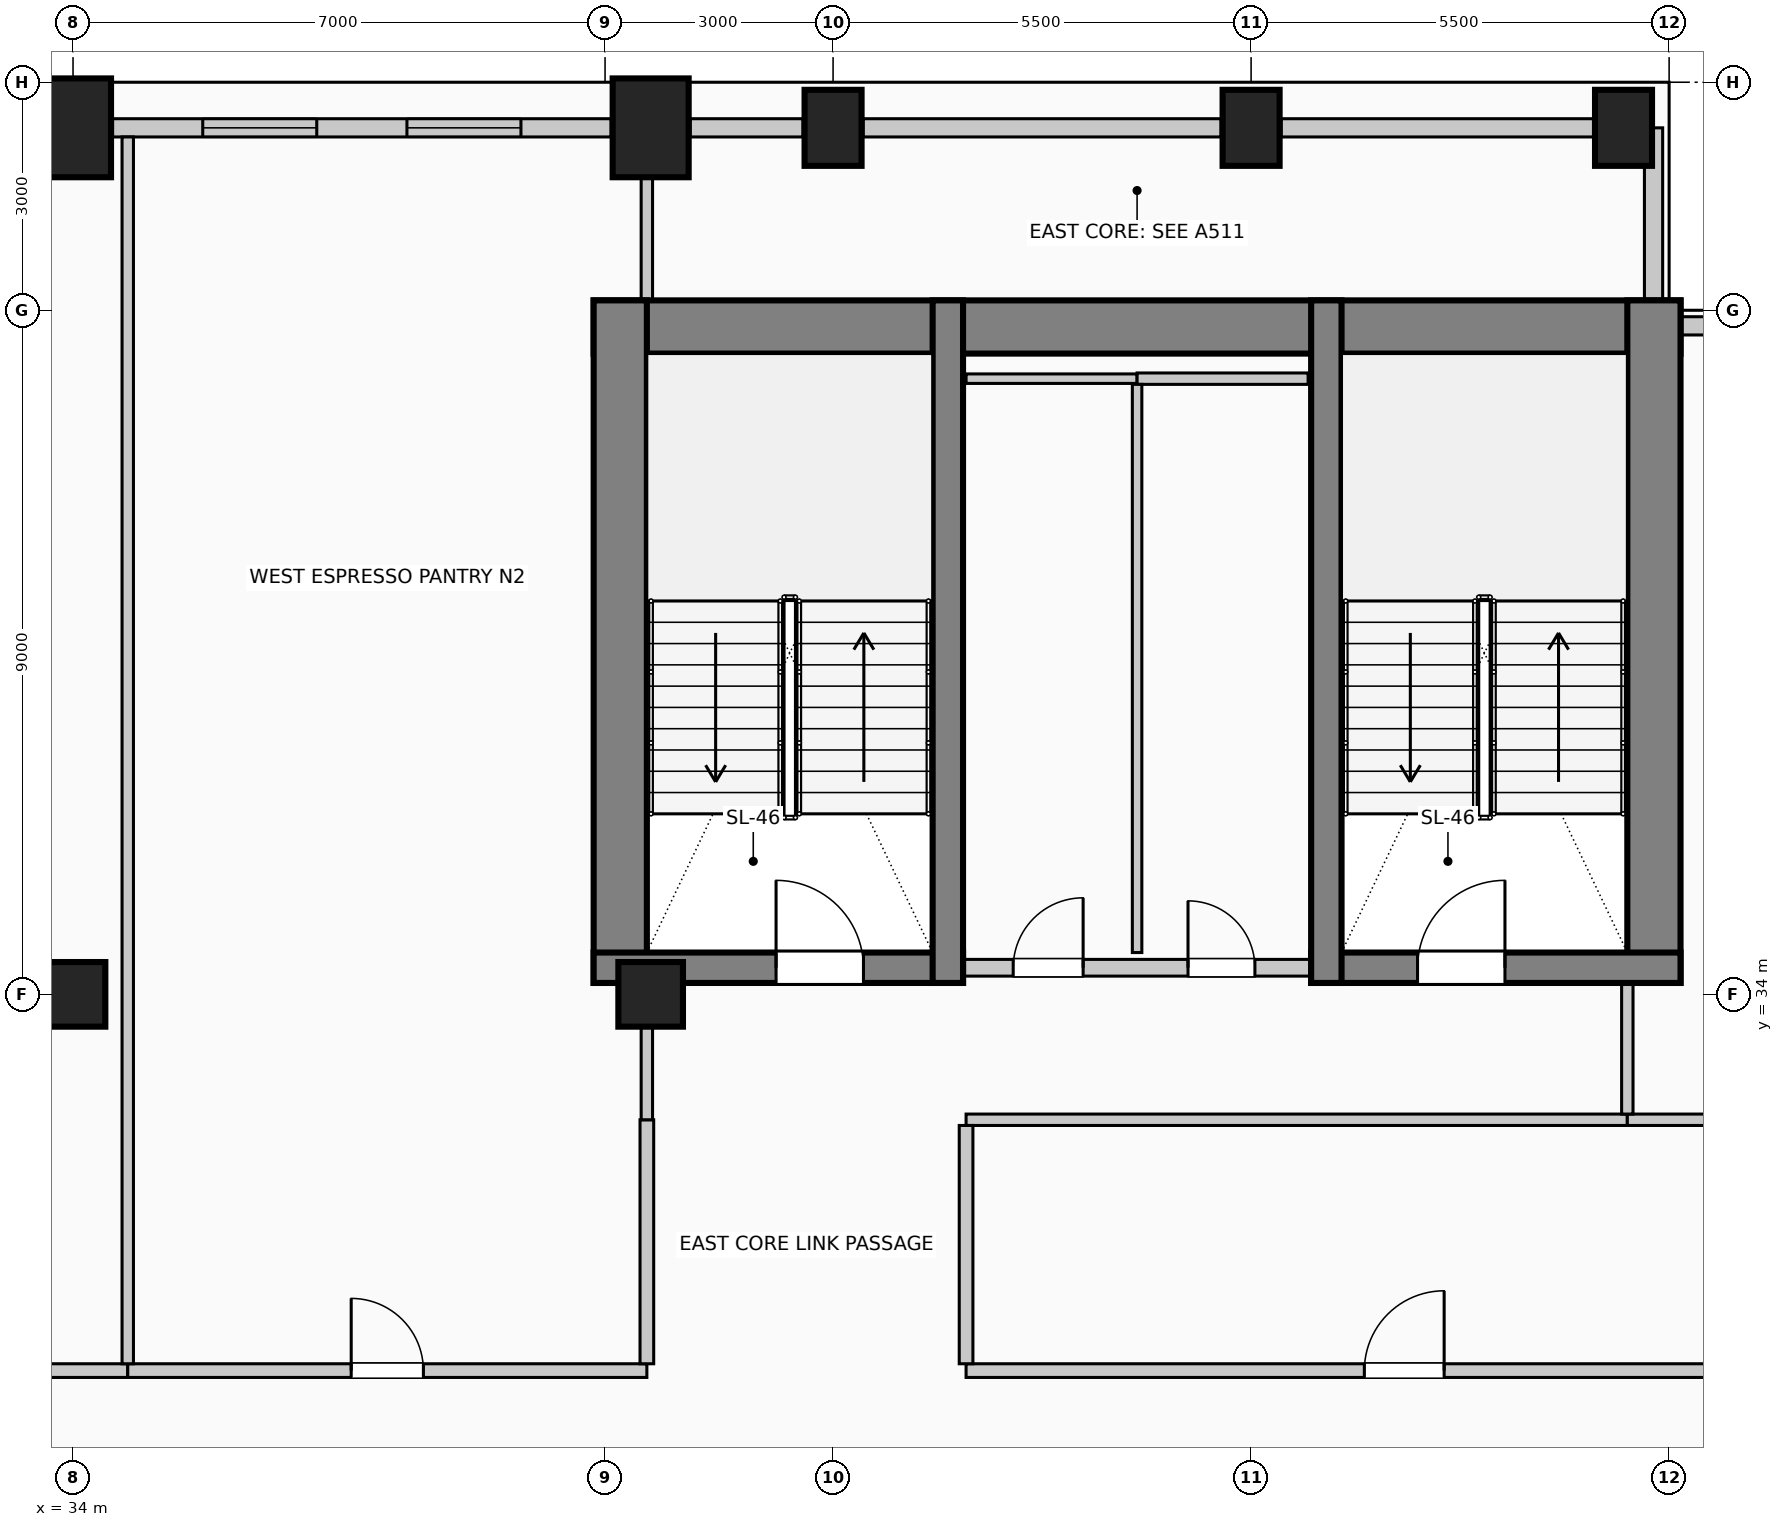
"""IFC4 building model, lengths in metres.
Left out: names, types, materials, properties, quantities, classifications, styles, units other than length and angle.
Written with IfcOpenShell. Run it as: python <this file> out.ifc"""

import sys

from ifc_helpers import new_model, si_unit, direction, frame, frame_2d, origin, origin_2d, place, context, subcontext, project, spatial, rectangle, circle, extrude, element, fill, save


model = new_model("IFC4")
c1 = context("Model", 3, precision=1e-05, world=origin(), true_north=direction((0.0, 1.0)))
c2 = subcontext(c1, "Body", "Model", "MODEL_VIEW")
j1 = project(units=[si_unit("LENGTHUNIT", "METRE"), si_unit("PLANEANGLEUNIT", "RADIAN")], contexts=[c1])
p1 = place(None, origin())
s1 = spatial("IfcSite", under=j1, at=p1, CompositionType="ELEMENT")
p2 = place(p1, origin())
s2 = spatial("IfcBuilding", under=s1, at=p2, CompositionType="ELEMENT")
p3 = place(p2, frame((0.0, 0.0, 234.6)))
s3 = spatial("IfcBuildingStorey", under=s2, at=p3, CompositionType="ELEMENT", Elevation=234.6)
p4 = place(p3, frame((40.85, 42.78, 0.0), z_axis=(0.0, 0.0, 1.0), x_axis=(1.0, 0.0, 0.0)))
e1 = element("IfcWall", 1, at=p4, inside=s3, PredefinedType="SHEAR", context=c2, shape_type="SweptSolid", body=[
    extrude(rectangle(XDim=14.3, YDim=0.7, at=frame_2d((7.15, 0.0))), origin(), (0.0, 0.0, 1.0), 4.0),
])
for number, where, z_axis, x_axis in (
    (2, (41.2, 34.15, 0.0), (0.0, 0.0, 1.0), (0.0, 1.0, 0.0)),
    (3, (54.8, 34.15, 0.0), (0.0, 0.0, 1.0), (0.0, 1.0, 0.0)),
):
    element("IfcWall", number, at=place(p3, frame(where, z_axis=z_axis, x_axis=x_axis)), inside=s3, PredefinedType="SHEAR", context=c2, shape_type="SweptSolid", body=[
        extrude(rectangle(XDim=8.98, YDim=0.7, at=frame_2d((4.49, 0.0))), origin(), (0.0, 0.0, 1.0), 4.0),
    ])
p5 = place(p3, frame((40.85, 34.35, 0.0), z_axis=(0.0, 0.0, 1.0), x_axis=(1.0, 0.0, 0.0)))
e4 = element("IfcWall", 4, at=p5, inside=s3, PredefinedType="SHEAR", context=c2, shape_type="SweptSolid", body=[
    extrude(rectangle(XDim=4.86, YDim=0.4, at=frame_2d((2.43, 0.0))), origin(), (0.0, 0.0, 1.0), 4.0),
])
p6 = place(p5, frame((2.4, 0.0, 0.0)))
e5 = element("IfcOpeningElement", 5, at=p6, cuts=e4, PredefinedType="OPENING", context=c2, shape_type="SweptSolid", body=[
    extrude(rectangle(XDim=1.15, YDim=2.2, at=frame_2d((0.575, 1.1))), frame((0.0, 0.21, 0.0), z_axis=(0.0, -1.0, 0.0), x_axis=(1.0, 0.0, 0.0)), (0.0, 0.0, 1.0), 0.42),
])
p7 = place(p3, frame((45.51, 34.15, 0.0), z_axis=(0.0, 0.0, 1.0), x_axis=(0.0, 1.0, 0.0)))
e6 = element("IfcWall", 6, at=p7, inside=s3, PredefinedType="SHEAR", context=c2, shape_type="SweptSolid", body=[
    extrude(rectangle(XDim=8.98, YDim=0.4, at=frame_2d((4.49, 0.0))), origin(), (0.0, 0.0, 1.0), 4.0),
])
p8 = place(p3, frame((50.29, 34.35, 0.0), z_axis=(0.0, 0.0, 1.0), x_axis=(1.0, 0.0, 0.0)))
e7 = element("IfcWall", 7, at=p8, inside=s3, PredefinedType="SHEAR", context=c2, shape_type="SweptSolid", body=[
    extrude(rectangle(XDim=4.86, YDim=0.4, at=frame_2d((2.43, 0.0))), origin(), (0.0, 0.0, 1.0), 4.0),
])
p9 = place(p8, frame((1.4, 0.0, 0.0)))
e8 = element("IfcOpeningElement", 8, at=p9, cuts=e7, PredefinedType="OPENING", context=c2, shape_type="SweptSolid", body=[
    extrude(rectangle(XDim=1.15, YDim=2.2, at=frame_2d((0.575, 1.1))), frame((0.0, 0.21, 0.0), z_axis=(0.0, -1.0, 0.0), x_axis=(1.0, 0.0, 0.0)), (0.0, 0.0, 1.0), 0.42),
])
p10 = place(p3, frame((50.49, 34.15, 0.0), z_axis=(0.0, 0.0, 1.0), x_axis=(0.0, 1.0, 0.0)))
e9 = element("IfcWall", 9, at=p10, inside=s3, PredefinedType="SHEAR", context=c2, shape_type="SweptSolid", body=[
    extrude(rectangle(XDim=8.98, YDim=0.4, at=frame_2d((4.49, 0.0))), origin(), (0.0, 0.0, 1.0), 4.0),
])
for number, where, z_axis, x_axis in (
    (10, (34.0, 45.4, 0.0), (0.0, 0.0, 1.0), (1.0, 0.0, 0.0)),
    (11, (41.6, 45.4, 0.0), (0.0, 0.0, 1.0), (1.0, 0.0, 0.0)),
):
    element("IfcColumn", number, at=place(p3, frame(where, z_axis=z_axis, x_axis=x_axis)), inside=s3, PredefinedType="COLUMN", context=c2, shape_type="SweptSolid", body=[
        extrude(rectangle(XDim=1.0, YDim=1.3, at=origin_2d()), origin(), (0.0, 0.0, 1.0), 4.0),
    ])
for number, where, z_axis, x_axis in (
    (12, (44.0, 45.4, 0.0), (0.0, 0.0, 1.0), (1.0, 0.0, 0.0)),
    (13, (49.5, 45.4, 0.0), (0.0, 0.0, 1.0), (1.0, 0.0, 0.0)),
    (14, (54.4, 45.4, 0.0), (0.0, 0.0, 1.0), (1.0, 0.0, 0.0)),
):
    element("IfcColumn", number, at=place(p3, frame(where, z_axis=z_axis, x_axis=x_axis)), inside=s3, PredefinedType="COLUMN", context=c2, shape_type="SweptSolid", body=[
        extrude(rectangle(XDim=0.75, YDim=1.0, at=origin_2d()), origin(), (0.0, 0.0, 1.0), 4.0),
    ])
for number, where, z_axis, x_axis in (
    (15, (41.6, 34.0, 0.0), (0.0, 0.0, 1.0), (1.0, 0.0, 0.0)),
    (16, (34.0, 34.0, 0.0), (0.0, 0.0, 1.0), (1.0, 0.0, 0.0)),
):
    element("IfcColumn", number, at=place(p3, frame(where, z_axis=z_axis, x_axis=x_axis)), inside=s3, PredefinedType="COLUMN", context=c2, shape_type="SweptSolid", body=[
        extrude(circle(Radius=0.425, at=origin_2d()), origin(), (0.0, 0.0, 1.0), 4.0),
    ])
p11 = place(p3, frame((34.52, 45.4, 0.0), z_axis=(0.0, 0.0, 1.0), x_axis=(1.0, 0.0, 0.0)))
e17 = element("IfcWall", 17, at=p11, inside=s3, PredefinedType="SOLIDWALL", context=c2, shape_type="SweptSolid", body=[
    extrude(rectangle(XDim=6.56, YDim=0.24, at=frame_2d((3.28, 0.0))), origin(), (0.0, 0.0, 1.0), 2.91),
])
p12 = place(p11, frame((1.187, 0.0, 0.42)))
e18 = element("IfcOpeningElement", 18, at=p12, cuts=e17, PredefinedType="OPENING", context=c2, shape_type="SweptSolid", body=[
    extrude(rectangle(XDim=1.5, YDim=2.2, at=frame_2d((0.75, 1.1))), frame((0.0, 0.13, 0.0), z_axis=(0.0, -1.0, 0.0), x_axis=(1.0, 0.0, 0.0)), (0.0, 0.0, 1.0), 0.26),
])
p13 = place(p11, frame((3.873, 0.0, 0.42)))
e19 = element("IfcOpeningElement", 19, at=p13, cuts=e17, PredefinedType="OPENING", context=c2, shape_type="SweptSolid", body=[
    extrude(rectangle(XDim=1.5, YDim=2.2, at=frame_2d((0.75, 1.1))), frame((0.0, 0.13, 0.0), z_axis=(0.0, -1.0, 0.0), x_axis=(1.0, 0.0, 0.0)), (0.0, 0.0, 1.0), 0.26),
])
p14 = place(p3, frame((42.12, 45.4, 0.0), z_axis=(0.0, 0.0, 1.0), x_axis=(1.0, 0.0, 0.0)))
e20 = element("IfcWall", 20, at=p14, inside=s3, PredefinedType="SOLIDWALL", context=c2, shape_type="SweptSolid", body=[
    extrude(rectangle(XDim=1.485, YDim=0.24, at=frame_2d((0.742, 0.0))), origin(), (0.0, 0.0, 1.0), 2.91),
])
p15 = place(p3, frame((44.395, 45.4, 0.0), z_axis=(0.0, 0.0, 1.0), x_axis=(1.0, 0.0, 0.0)))
e21 = element("IfcWall", 21, at=p15, inside=s3, PredefinedType="SOLIDWALL", context=c2, shape_type="SweptSolid", body=[
    extrude(rectangle(XDim=4.71, YDim=0.24, at=frame_2d((2.355, 0.0))), origin(), (0.0, 0.0, 1.0), 2.91),
])
p16 = place(p3, frame((49.895, 45.4, 0.0), z_axis=(0.0, 0.0, 1.0), x_axis=(1.0, 0.0, 0.0)))
e22 = element("IfcWall", 22, at=p16, inside=s3, PredefinedType="SOLIDWALL", context=c2, shape_type="SweptSolid", body=[
    extrude(rectangle(XDim=4.11, YDim=0.24, at=frame_2d((2.055, 0.0))), origin(), (0.0, 0.0, 1.0), 2.91),
])
p17 = place(p3, frame((54.795, 45.4, 0.0), z_axis=(0.0, 0.0, 1.0), x_axis=(0.0, -1.0, 0.0)))
e23 = element("IfcWall", 23, at=p17, inside=s3, PredefinedType="SOLIDWALL", context=c2, shape_type="SweptSolid", body=[
    extrude(rectangle(XDim=2.265, YDim=0.24, at=frame_2d((1.132, 0.0))), origin(), (0.0, 0.0, 1.0), 3.66),
])
p18 = place(p3, frame((55.155, 42.795, 0.0), z_axis=(0.0, 0.0, 1.0), x_axis=(1.0, 0.0, 0.0)))
e24 = element("IfcWall", 24, at=p18, inside=s3, PredefinedType="SOLIDWALL", context=c2, shape_type="SweptSolid", body=[
    extrude(rectangle(XDim=2.245, YDim=0.24, at=frame_2d((1.123, 0.0))), origin(), (0.0, 0.0, 1.0), 3.66),
])
p19 = place(p3, frame((45.72, 34.35, 0.0), z_axis=(0.0, 0.0, 1.0), x_axis=(1.0, 0.0, 0.0)))
e25 = element("IfcWall", 25, at=p19, inside=s3, PredefinedType="PARTITIONING", context=c2, shape_type="SweptSolid", body=[
    extrude(rectangle(XDim=4.56, YDim=0.22, at=frame_2d((2.28, 0.0))), origin(), (0.0, 0.0, 1.0), 3.66),
])
p20 = place(p19, frame((0.65, 0.0, 0.0)))
e26 = element("IfcOpeningElement", 26, at=p20, cuts=e25, PredefinedType="OPENING", context=c2, shape_type="SweptSolid", body=[
    extrude(rectangle(XDim=0.92, YDim=2.1, at=frame_2d((0.46, 1.05))), frame((0.0, 0.12, 0.0), z_axis=(0.0, -1.0, 0.0), x_axis=(1.0, 0.0, 0.0)), (0.0, 0.0, 1.0), 0.24),
])
p21 = place(p19, frame((2.95, 0.0, 0.0)))
e27 = element("IfcOpeningElement", 27, at=p21, cuts=e25, PredefinedType="OPENING", context=c2, shape_type="SweptSolid", body=[
    extrude(rectangle(XDim=0.88, YDim=2.1, at=frame_2d((0.44, 1.05))), frame((0.0, 0.12, 0.0), z_axis=(0.0, -1.0, 0.0), x_axis=(1.0, 0.0, 0.0)), (0.0, 0.0, 1.0), 0.24),
])
p22 = place(p3, frame((23.1, 29.05, 0.0), z_axis=(0.0, 0.0, 1.0), x_axis=(1.0, 0.0, 0.0)))
e28 = element("IfcWall", 28, at=p22, inside=s3, PredefinedType="PARTITIONING", context=c2, shape_type="SweptSolid", body=[
    extrude(rectangle(XDim=11.62, YDim=0.18, at=frame_2d((5.81, 0.0))), origin(), (0.0, 0.0, 1.0), 3.66),
])
p23 = place(p22, frame((5.285, 0.0, 0.0)))
e29 = element("IfcOpeningElement", 29, at=p23, cuts=e28, PredefinedType="OPENING", context=c2, shape_type="SweptSolid", body=[
    extrude(rectangle(XDim=1.05, YDim=2.15, at=frame_2d((0.525, 1.075))), frame((0.0, 0.1, 0.0), z_axis=(0.0, -1.0, 0.0), x_axis=(1.0, 0.0, 0.0)), (0.0, 0.0, 1.0), 0.2),
])
p24 = place(p3, frame((34.72, 29.05, 0.0), z_axis=(0.0, 0.0, 1.0), x_axis=(1.0, 0.0, 0.0)))
e30 = element("IfcWall", 30, at=p24, inside=s3, PredefinedType="PARTITIONING", context=c2, shape_type="SweptSolid", body=[
    extrude(rectangle(XDim=6.83, YDim=0.18, at=frame_2d((3.415, 0.0))), origin(), (0.0, 0.0, 1.0), 3.66),
])
p25 = place(p24, frame((2.94, 0.0, 0.0)))
e31 = element("IfcOpeningElement", 31, at=p25, cuts=e30, PredefinedType="OPENING", context=c2, shape_type="SweptSolid", body=[
    extrude(rectangle(XDim=0.95, YDim=2.15, at=frame_2d((0.475, 1.075))), frame((0.0, 0.1, 0.0), z_axis=(0.0, -1.0, 0.0), x_axis=(1.0, 0.0, 0.0)), (0.0, 0.0, 1.0), 0.2),
])
p26 = place(p3, frame((45.75, 29.05, 0.0), z_axis=(0.0, 0.0, 1.0), x_axis=(1.0, 0.0, 0.0)))
e32 = element("IfcWall", 32, at=p26, inside=s3, PredefinedType="PARTITIONING", context=c2, shape_type="SweptSolid", body=[
    extrude(rectangle(XDim=11.53, YDim=0.18, at=frame_2d((5.765, 0.0))), origin(), (0.0, 0.0, 1.0), 3.66),
])
p27 = place(p26, frame((5.24, 0.0, 0.0)))
e33 = element("IfcOpeningElement", 33, at=p27, cuts=e32, PredefinedType="OPENING", context=c2, shape_type="SweptSolid", body=[
    extrude(rectangle(XDim=1.05, YDim=2.15, at=frame_2d((0.525, 1.075))), frame((0.0, 0.1, 0.0), z_axis=(0.0, -1.0, 0.0), x_axis=(1.0, 0.0, 0.0)), (0.0, 0.0, 1.0), 0.2),
])
p28 = place(p3, frame((45.75, 32.35, 0.0), z_axis=(0.0, 0.0, 1.0), x_axis=(1.0, 0.0, 0.0)))
e34 = element("IfcWall", 34, at=p28, inside=s3, PredefinedType="PARTITIONING", context=c2, shape_type="SweptSolid", body=[
    extrude(rectangle(XDim=8.7, YDim=0.15, at=frame_2d((4.35, 0.0))), origin(), (0.0, 0.0, 1.0), 3.66),
])
p29 = place(p3, frame((54.45, 32.35, 0.0), z_axis=(0.0, 0.0, 1.0), x_axis=(1.0, 0.0, 0.0)))
e35 = element("IfcWall", 35, at=p29, inside=s3, PredefinedType="PARTITIONING", context=c2, shape_type="SweptSolid", body=[
    extrude(rectangle(XDim=2.83, YDim=0.15, at=frame_2d((1.415, 0.0))), origin(), (0.0, 0.0, 1.0), 3.66),
])
p30 = place(p3, frame((45.75, 42.1, 0.0), z_axis=(0.0, 0.0, 1.0), x_axis=(1.0, 0.0, 0.0)))
e36 = element("IfcWall", 36, at=p30, inside=s3, PredefinedType="PARTITIONING", context=c2, shape_type="SweptSolid", body=[
    extrude(rectangle(XDim=2.25, YDim=0.125, at=frame_2d((1.125, 0.0))), origin(), (0.0, 0.0, 1.0), 3.66),
])
p31 = place(p3, frame((48.0, 42.1, 0.0), z_axis=(0.0, 0.0, 1.0), x_axis=(1.0, 0.0, 0.0)))
e37 = element("IfcWall", 37, at=p31, inside=s3, PredefinedType="PARTITIONING", context=c2, shape_type="SweptSolid", body=[
    extrude(rectangle(XDim=2.25, YDim=0.15, at=frame_2d((1.125, 0.0))), origin(), (0.0, 0.0, 1.0), 3.66),
])
p32 = place(p3, frame((34.72, 29.14, 0.0), z_axis=(0.0, 0.0, 1.0), x_axis=(0.0, 1.0, 0.0)))
e38 = element("IfcWall", 38, at=p32, inside=s3, PredefinedType="PARTITIONING", context=c2, shape_type="SweptSolid", body=[
    extrude(rectangle(XDim=16.14, YDim=0.15, at=frame_2d((8.07, 0.0))), origin(), (0.0, 0.0, 1.0), 3.66),
])
p33 = place(p3, frame((41.55, 29.14, 0.0), z_axis=(0.0, 0.0, 1.0), x_axis=(0.0, 1.0, 0.0)))
e39 = element("IfcWall", 39, at=p33, inside=s3, PredefinedType="PARTITIONING", context=c2, shape_type="SweptSolid", body=[
    extrude(rectangle(XDim=3.21, YDim=0.18, at=frame_2d((1.605, 0.0))), origin(), (0.0, 0.0, 1.0), 3.055),
])
p34 = place(p3, frame((41.55, 32.35, 0.0), z_axis=(0.0, 0.0, 1.0), x_axis=(0.0, 1.0, 0.0)))
e40 = element("IfcWall", 40, at=p34, inside=s3, PredefinedType="PARTITIONING", context=c2, shape_type="SweptSolid", body=[
    extrude(rectangle(XDim=1.225, YDim=0.15, at=frame_2d((0.612, 0.0))), origin(), (0.0, 0.0, 1.0), 3.055),
])
p35 = place(p3, frame((41.55, 43.13, 0.0), z_axis=(0.0, 0.0, 1.0), x_axis=(0.0, 1.0, 0.0)))
e41 = element("IfcWall", 41, at=p35, inside=s3, PredefinedType="PARTITIONING", context=c2, shape_type="SweptSolid", body=[
    extrude(rectangle(XDim=1.62, YDim=0.15, at=frame_2d((0.81, 0.0))), origin(), (0.0, 0.0, 1.0), 3.66),
])
p36 = place(p3, frame((45.75, 29.14, 0.0), z_axis=(0.0, 0.0, 1.0), x_axis=(0.0, 1.0, 0.0)))
e42 = element("IfcWall", 42, at=p36, inside=s3, PredefinedType="PARTITIONING", context=c2, shape_type="SweptSolid", body=[
    extrude(rectangle(XDim=3.135, YDim=0.18, at=frame_2d((1.567, 0.0))), origin(), (0.0, 0.0, 1.0), 3.66),
])
p37 = place(p3, frame((48.0, 34.55, 0.0), z_axis=(0.0, 0.0, 1.0), x_axis=(0.0, 1.0, 0.0)))
e43 = element("IfcWall", 43, at=p37, inside=s3, PredefinedType="PARTITIONING", context=c2, shape_type="SweptSolid", body=[
    extrude(rectangle(XDim=7.475, YDim=0.125, at=frame_2d((3.737, 0.0))), origin(), (0.0, 0.0, 1.0), 3.66),
])
p38 = place(p3, frame((54.45, 32.425, 0.0), z_axis=(0.0, 0.0, 1.0), x_axis=(0.0, 1.0, 0.0)))
e44 = element("IfcWall", 44, at=p38, inside=s3, PredefinedType="PARTITIONING", context=c2, shape_type="SweptSolid", body=[
    extrude(rectangle(XDim=1.725, YDim=0.15, at=frame_2d((0.862, 0.0))), origin(), (0.0, 0.0, 1.0), 3.66),
])
p39 = place(p12, origin())
e45 = element("IfcWindow", 45, at=p39, inside=s3, PartitioningType="SINGLE_PANEL", PredefinedType="WINDOW", context=c2, shape_type="SweptSolid", body=[
    extrude(rectangle(XDim=1.5, YDim=2.2, at=frame_2d((0.75, 1.1))), frame((0.0, 0.03, 0.0), z_axis=(0.0, -1.0, 0.0), x_axis=(1.0, 0.0, 0.0)), (0.0, 0.0, 1.0), 0.06),
])
fill(e18, e45)
p40 = place(p13, origin())
e46 = element("IfcWindow", 46, at=p40, inside=s3, PartitioningType="SINGLE_PANEL", PredefinedType="WINDOW", context=c2, shape_type="SweptSolid", body=[
    extrude(rectangle(XDim=1.5, YDim=2.2, at=frame_2d((0.75, 1.1))), frame((0.0, 0.03, 0.0), z_axis=(0.0, -1.0, 0.0), x_axis=(1.0, 0.0, 0.0)), (0.0, 0.0, 1.0), 0.06),
])
fill(e19, e46)
p41 = place(p6, origin())
e47 = element("IfcDoor", 47, at=p41, inside=s3, OperationType="SINGLE_SWING_LEFT", PredefinedType="DOOR", context=c2, shape_type="SweptSolid", body=[
    extrude(rectangle(XDim=1.15, YDim=2.2, at=frame_2d((0.575, 1.1))), frame((0.0, 0.025, 0.0), z_axis=(0.0, -1.0, 0.0), x_axis=(1.0, 0.0, 0.0)), (0.0, 0.0, 1.0), 0.05),
])
fill(e5, e47)
p42 = place(p20, origin())
e48 = element("IfcDoor", 48, at=p42, inside=s3, OperationType="SINGLE_SWING_RIGHT", PredefinedType="DOOR", context=c2, shape_type="SweptSolid", body=[
    extrude(rectangle(XDim=0.92, YDim=2.1, at=frame_2d((0.46, 1.05))), frame((0.0, 0.025, 0.0), z_axis=(0.0, -1.0, 0.0), x_axis=(1.0, 0.0, 0.0)), (0.0, 0.0, 1.0), 0.05),
])
fill(e26, e48)
p43 = place(p21, origin())
e49 = element("IfcDoor", 49, at=p43, inside=s3, OperationType="SINGLE_SWING_LEFT", PredefinedType="DOOR", context=c2, shape_type="SweptSolid", body=[
    extrude(rectangle(XDim=0.88, YDim=2.1, at=frame_2d((0.44, 1.05))), frame((0.0, 0.025, 0.0), z_axis=(0.0, -1.0, 0.0), x_axis=(1.0, 0.0, 0.0)), (0.0, 0.0, 1.0), 0.05),
])
fill(e27, e49)
p44 = place(p9, origin())
e50 = element("IfcDoor", 50, at=p44, inside=s3, OperationType="SINGLE_SWING_RIGHT", PredefinedType="DOOR", context=c2, shape_type="SweptSolid", body=[
    extrude(rectangle(XDim=1.15, YDim=2.2, at=frame_2d((0.575, 1.1))), frame((0.0, 0.025, 0.0), z_axis=(0.0, -1.0, 0.0), x_axis=(1.0, 0.0, 0.0)), (0.0, 0.0, 1.0), 0.05),
])
fill(e8, e50)
p45 = place(p25, origin())
e51 = element("IfcDoor", 51, at=p45, inside=s3, OperationType="SINGLE_SWING_LEFT", PredefinedType="DOOR", context=c2, shape_type="SweptSolid", body=[
    extrude(rectangle(XDim=0.95, YDim=2.15, at=frame_2d((0.475, 1.075))), frame((0.0, 0.025, 0.0), z_axis=(0.0, -1.0, 0.0), x_axis=(1.0, 0.0, 0.0)), (0.0, 0.0, 1.0), 0.05),
])
fill(e31, e51)
p46 = place(p27, origin())
e52 = element("IfcDoor", 52, at=p46, inside=s3, OperationType="SINGLE_SWING_RIGHT", PredefinedType="DOOR", context=c2, shape_type="SweptSolid", body=[
    extrude(rectangle(XDim=1.05, YDim=2.15, at=frame_2d((0.525, 1.075))), frame((0.0, 0.025, 0.0), z_axis=(0.0, -1.0, 0.0), x_axis=(1.0, 0.0, 0.0)), (0.0, 0.0, 1.0), 0.05),
])
fill(e33, e52)
save(model, sys.argv[1])
